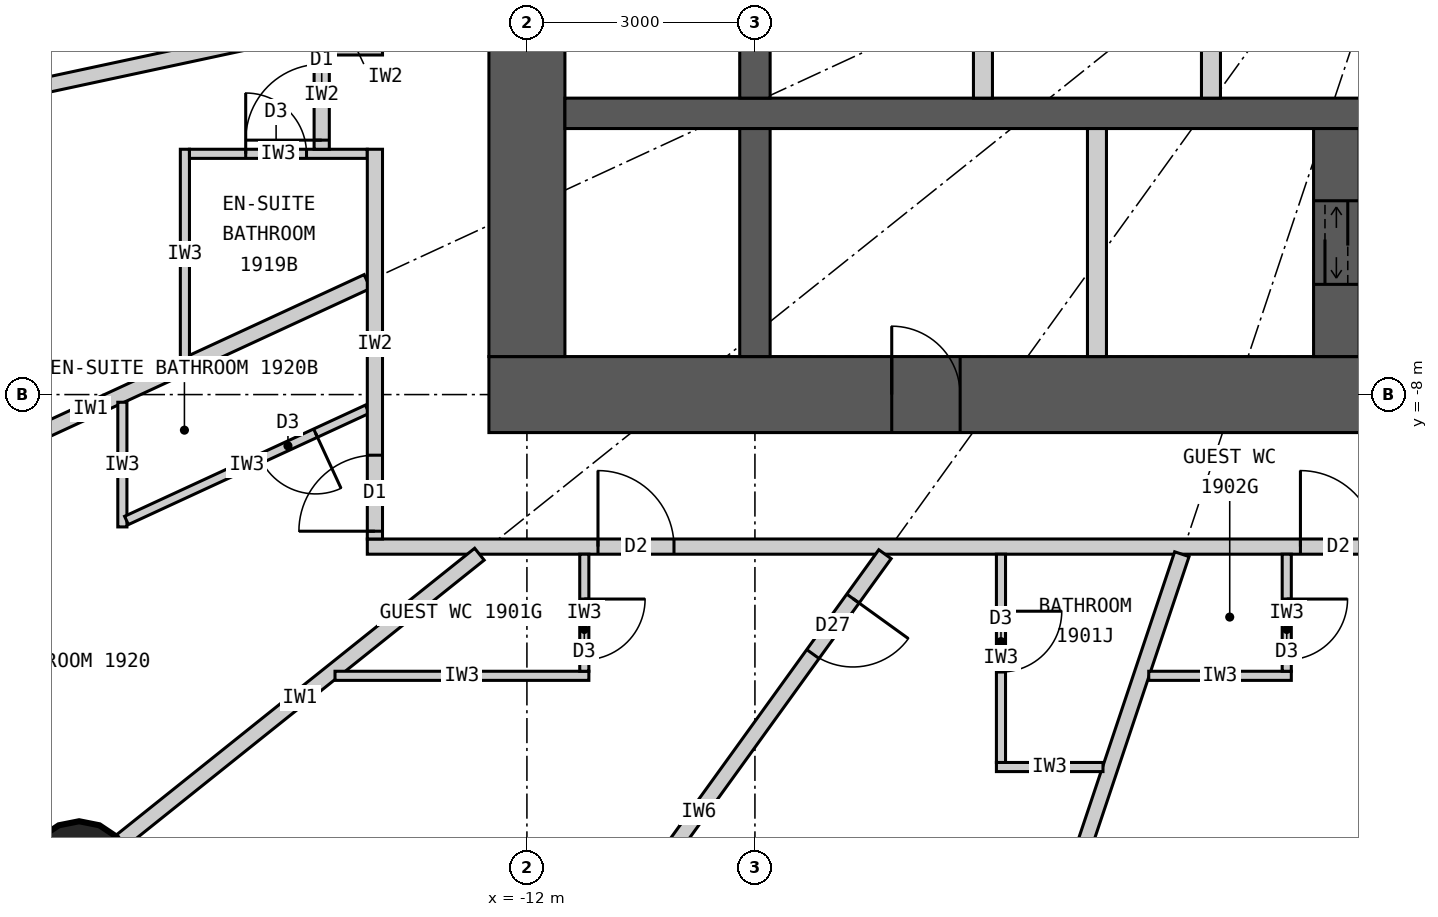
"""IFC4 building model, lengths in metres.
Left out: names, types, materials, properties, quantities, classifications, styles, units other than length and angle.
Written with IfcOpenShell. Run it as: python <this file> out.ifc"""

import sys

from ifc_helpers import new_model, si_unit, direction, frame, frame_2d, origin, origin_2d, place, context, subcontext, project, spatial, rectangle, circle, extrude, element, fill, save


model = new_model("IFC4")
c1 = context("Model", 3, precision=1e-05, world=origin(), true_north=direction((0.0, 1.0)))
c2 = subcontext(c1, "Body", "Model", "MODEL_VIEW")
j1 = project(units=[si_unit("LENGTHUNIT", "METRE"), si_unit("PLANEANGLEUNIT", "RADIAN")], contexts=[c1])
p1 = place(None, origin())
s1 = spatial("IfcSite", under=j1, at=p1, CompositionType="ELEMENT")
p2 = place(p1, origin())
s2 = spatial("IfcBuilding", under=s1, at=p2, CompositionType="ELEMENT")
p3 = place(p2, frame((0.0, 0.0, 77.1)))
s3 = spatial("IfcBuildingStorey", under=s2, at=p3, CompositionType="ELEMENT", Elevation=77.1)
p4 = place(p3, frame((-17.892, -14.313, 0.0), z_axis=(0.0, 0.0, 1.0), x_axis=(1.0, 0.0, 0.0)))
e1 = element("IfcColumn", 1, at=p4, inside=s3, PredefinedType="COLUMN", context=c2, shape_type="SweptSolid", body=[
    extrude(circle(Radius=0.7, at=origin_2d()), origin(), (0.0, 0.0, 1.0), 3.3),
])
p5 = place(p3, frame((12.5, -8.0, 0.0), z_axis=(0.0, 0.0, 1.0), x_axis=(-1.0, 0.0, 0.0)))
e2 = element("IfcWall", 2, at=p5, inside=s3, PredefinedType="SHEAR", context=c2, shape_type="SweptSolid", body=[
    extrude(rectangle(XDim=25.0, YDim=1.0, at=frame_2d((12.5, 0.0))), origin(), (0.0, 0.0, 1.0), 3.3),
])
p6 = place(p5, frame((11.2, 0.0, 0.0)))
e3 = element("IfcOpeningElement", 3, at=p6, cuts=e2, PredefinedType="OPENING", context=c2, shape_type="SweptSolid", body=[
    extrude(rectangle(XDim=1.2, YDim=2.2, at=frame_2d((0.6, 1.1))), frame((0.0, 0.51, 0.0), z_axis=(0.0, -1.0, 0.0), x_axis=(1.0, 0.0, 0.0)), (0.0, 0.0, 1.0), 1.02),
])
p7 = place(p5, frame((18.8, 0.0, 0.0)))
e4 = element("IfcOpeningElement", 4, at=p7, cuts=e2, PredefinedType="OPENING", context=c2, shape_type="SweptSolid", body=[
    extrude(rectangle(XDim=0.9, YDim=2.2, at=frame_2d((0.45, 1.1))), frame((0.0, 0.51, 0.0), z_axis=(0.0, -1.0, 0.0), x_axis=(1.0, 0.0, 0.0)), (0.0, 0.0, 1.0), 1.02),
])
p8 = place(p3, frame((-12.0, 7.5, 0.0), z_axis=(0.0, 0.0, 1.0), x_axis=(0.0, -1.0, 0.0)))
e5 = element("IfcWall", 5, at=p8, inside=s3, PredefinedType="SHEAR", context=c2, shape_type="SweptSolid", body=[
    extrude(rectangle(XDim=15.0, YDim=1.0, at=frame_2d((7.5, 0.0))), origin(), (0.0, 0.0, 1.0), 3.3),
])
p9 = place(p8, frame((6.6, 0.0, 0.0)))
e6 = element("IfcOpeningElement", 6, at=p9, cuts=e5, PredefinedType="OPENING", context=c2, shape_type="SweptSolid", body=[
    extrude(rectangle(XDim=1.8, YDim=2.2, at=frame_2d((0.9, 1.1))), frame((0.0, 0.51, 0.0), z_axis=(0.0, -1.0, 0.0), x_axis=(1.0, 0.0, 0.0)), (0.0, 0.0, 1.0), 1.02),
])
p10 = place(p3, frame((-11.5, -4.3, 0.0), z_axis=(0.0, 0.0, 1.0), x_axis=(1.0, 0.0, 0.0)))
e7 = element("IfcWall", 7, at=p10, inside=s3, PredefinedType="SHEAR", context=c2, shape_type="SweptSolid", body=[
    extrude(rectangle(XDim=23.0, YDim=0.4, at=frame_2d((11.5, 0.0))), origin(), (0.0, 0.0, 1.0), 3.3),
])
p11 = place(p3, frame((-9.0, -4.1, 0.0), z_axis=(0.0, 0.0, 1.0), x_axis=(0.0, 1.0, 0.0)))
e8 = element("IfcWall", 8, at=p11, inside=s3, PredefinedType="SHEAR", context=c2, shape_type="SweptSolid", body=[
    extrude(rectangle(XDim=2.35, YDim=0.4, at=frame_2d((1.175, 0.0))), origin(), (0.0, 0.0, 1.0), 3.3),
])
p12 = place(p3, frame((-9.0, -7.5, 0.0), z_axis=(0.0, 0.0, 1.0), x_axis=(0.0, 1.0, 0.0)))
e9 = element("IfcWall", 9, at=p12, inside=s3, PredefinedType="SHEAR", context=c2, shape_type="SweptSolid", body=[
    extrude(rectangle(XDim=3.0, YDim=0.4, at=frame_2d((1.5, 0.0))), origin(), (0.0, 0.0, 1.0), 3.3),
])
p13 = place(p3, frame((-1.35, -7.5, 0.0), z_axis=(0.0, 0.0, 1.0), x_axis=(0.0, 1.0, 0.0)))
e10 = element("IfcWall", 10, at=p13, inside=s3, PredefinedType="SHEAR", context=c2, shape_type="SweptSolid", body=[
    extrude(rectangle(XDim=3.0, YDim=0.6, at=frame_2d((1.5, 0.0))), origin(), (0.0, 0.0, 1.0), 3.3),
])
p14 = place(p13, frame((0.95, 0.0, 0.0)))
e11 = element("IfcOpeningElement", 11, at=p14, cuts=e10, PredefinedType="OPENING", context=c2, shape_type="SweptSolid", body=[
    extrude(rectangle(XDim=1.1, YDim=2.2, at=frame_2d((0.55, 1.1))), frame((0.0, 0.31, 0.0), z_axis=(0.0, -1.0, 0.0), x_axis=(1.0, 0.0, 0.0)), (0.0, 0.0, 1.0), 0.62),
])
p15 = place(p3, frame((-4.5, -7.5, 0.0), z_axis=(0.0, 0.0, 1.0), x_axis=(0.0, 1.0, 0.0)))
e12 = element("IfcWall", 12, at=p15, inside=s3, PredefinedType="PARTITIONING", context=c2, shape_type="SweptSolid", body=[
    extrude(rectangle(XDim=3.0, YDim=0.25, at=frame_2d((1.5, 0.0))), origin(), (0.0, 0.0, 1.0), 3.3),
])
for number, where, z_axis, x_axis in (
    (13, (-6.0, -4.1, 0.0), (0.0, 0.0, 1.0), (0.0, 1.0, 0.0)),
    (14, (-3.0, -4.1, 0.0), (0.0, 0.0, 1.0), (0.0, 1.0, 0.0)),
):
    element("IfcWall", number, at=place(p3, frame(where, z_axis=z_axis, x_axis=x_axis)), inside=s3, PredefinedType="PARTITIONING", context=c2, shape_type="SweptSolid", body=[
        extrude(rectangle(XDim=2.35, YDim=0.25, at=frame_2d((1.175, 0.0))), origin(), (0.0, 0.0, 1.0), 3.3),
    ])
p16 = place(p3, frame((14.1, -10.0, 0.0), z_axis=(0.0, 0.0, 1.0), x_axis=(-1.0, 0.0, 0.0)))
e15 = element("IfcWall", 15, at=p16, inside=s3, PredefinedType="PARTITIONING", context=c2, shape_type="SweptSolid", body=[
    extrude(rectangle(XDim=28.2, YDim=0.2, at=frame_2d((14.1, 0.0))), origin(), (0.0, 0.0, 1.0), 3.12),
])
p17 = place(p16, frame((24.165, 0.0, 0.0)))
e16 = element("IfcOpeningElement", 16, at=p17, cuts=e15, PredefinedType="OPENING", context=c2, shape_type="SweptSolid", body=[
    extrude(rectangle(XDim=1.0, YDim=2.2, at=frame_2d((0.5, 1.1))), frame((0.0, 0.11, 0.0), z_axis=(0.0, -1.0, 0.0), x_axis=(1.0, 0.0, 0.0)), (0.0, 0.0, 1.0), 0.22),
])
p18 = place(p16, frame((14.923, 0.0, 0.0)))
e17 = element("IfcOpeningElement", 17, at=p18, cuts=e15, PredefinedType="OPENING", context=c2, shape_type="SweptSolid", body=[
    extrude(rectangle(XDim=1.0, YDim=2.2, at=frame_2d((0.5, 1.1))), frame((0.0, 0.11, 0.0), z_axis=(0.0, -1.0, 0.0), x_axis=(1.0, 0.0, 0.0)), (0.0, 0.0, 1.0), 0.22),
])
p19 = place(p16, frame((3.035, 0.0, 0.0)))
e18 = element("IfcOpeningElement", 18, at=p19, cuts=e15, PredefinedType="OPENING", context=c2, shape_type="SweptSolid", body=[
    extrude(rectangle(XDim=1.0, YDim=2.2, at=frame_2d((0.5, 1.1))), frame((0.0, 0.11, 0.0), z_axis=(0.0, -1.0, 0.0), x_axis=(1.0, 0.0, 0.0)), (0.0, 0.0, 1.0), 0.22),
])
p20 = place(p3, frame((-14.1, -3.022, 0.0), z_axis=(0.0, 0.0, 1.0), x_axis=(-0.977790014929, -0.209586943072, 0.0)))
e19 = element("IfcWall", 19, at=p20, inside=s3, PredefinedType="PARTITIONING", context=c2, shape_type="SweptSolid", body=[
    extrude(rectangle(XDim=10.087, YDim=0.2, at=frame_2d((5.043, 0.0))), origin(), (0.0, 0.0, 1.0), 2.32),
])
p21 = place(p3, frame((-14.1, -6.512, 0.0), z_axis=(0.0, 0.0, 1.0), x_axis=(-0.907832871056, -0.419332181247, 0.0)))
e20 = element("IfcWall", 20, at=p21, inside=s3, PredefinedType="PARTITIONING", context=c2, shape_type="SweptSolid", body=[
    extrude(rectangle(XDim=8.023, YDim=0.2, at=frame_2d((4.011, 0.0))), origin(), (0.0, 0.0, 1.0), 2.32),
])
p22 = place(p3, frame((-12.625, -10.1, 0.0), z_axis=(0.0, 0.0, 1.0), x_axis=(-0.780892451574, -0.624665493744, 0.0)))
e21 = element("IfcWall", 21, at=p22, inside=s3, PredefinedType="PARTITIONING", context=c2, shape_type="SweptSolid", body=[
    extrude(rectangle(XDim=6.045, YDim=0.2, at=frame_2d((3.022, 0.0))), origin(), (0.0, 0.0, 1.0), 2.32),
])
p23 = place(p3, frame((-7.289, -10.1, 0.0), z_axis=(0.0, 0.0, 1.0), x_axis=(-0.585198353053, -0.810890182197, 0.0)))
e22 = element("IfcWall", 22, at=p23, inside=s3, PredefinedType="PARTITIONING", context=c2, shape_type="SweptSolid", body=[
    extrude(rectangle(XDim=8.36, YDim=0.2, at=frame_2d((4.18, 0.0))), origin(), (0.0, 0.0, 1.0), 2.32),
])
p24 = place(p23, frame((0.72, 0.0, 0.0)))
e23 = element("IfcOpeningElement", 23, at=p24, cuts=e22, PredefinedType="OPENING", context=c2, shape_type="SweptSolid", body=[
    extrude(rectangle(XDim=0.9, YDim=2.1, at=frame_2d((0.45, 1.05))), frame((0.0, 0.11, 0.0), z_axis=(0.0, -1.0, 0.0), x_axis=(1.0, 0.0, 0.0)), (0.0, 0.0, 1.0), 0.22),
])
p25 = place(p3, frame((-3.383, -10.1, 0.0), z_axis=(0.0, 0.0, 1.0), x_axis=(-0.31759592231, -0.948226149256, 0.0)))
e24 = element("IfcWall", 24, at=p25, inside=s3, PredefinedType="PARTITIONING", context=c2, shape_type="SweptSolid", body=[
    extrude(rectangle(XDim=9.098, YDim=0.2, at=frame_2d((4.549, 0.0))), origin(), (0.0, 0.0, 1.0), 2.32),
])
p26 = place(p3, frame((-14.525, -11.7, 0.0), z_axis=(0.0, 0.0, 1.0), x_axis=(1.0, 0.0, 0.0)))
e25 = element("IfcWall", 25, at=p26, inside=s3, PredefinedType="PARTITIONING", context=c2, shape_type="SweptSolid", body=[
    extrude(rectangle(XDim=3.34, YDim=0.12, at=frame_2d((1.67, 0.0))), origin(), (0.0, 0.0, 1.0), 3.12),
])
p27 = place(p3, frame((-11.245, -10.1, 0.0), z_axis=(0.0, 0.0, 1.0), x_axis=(0.0, -1.0, 0.0)))
e26 = element("IfcWall", 26, at=p27, inside=s3, PredefinedType="PARTITIONING", context=c2, shape_type="SweptSolid", body=[
    extrude(rectangle(XDim=1.54, YDim=0.12, at=frame_2d((0.77, 0.0))), origin(), (0.0, 0.0, 1.0), 3.12),
])
p28 = place(p27, frame((0.59, 0.0, 0.0)))
e27 = element("IfcOpeningElement", 27, at=p28, cuts=e26, PredefinedType="OPENING", context=c2, shape_type="SweptSolid", body=[
    extrude(rectangle(XDim=0.8, YDim=2.1, at=frame_2d((0.4, 1.05))), frame((0.0, 0.07, 0.0), z_axis=(0.0, -1.0, 0.0), x_axis=(1.0, 0.0, 0.0)), (0.0, 0.0, 1.0), 0.14),
])
p29 = place(p3, frame((-4.421, -12.9, 0.0), z_axis=(0.0, 0.0, 1.0), x_axis=(-1.0, 0.0, 0.0)))
e28 = element("IfcWall", 28, at=p29, inside=s3, PredefinedType="PARTITIONING", context=c2, shape_type="SweptSolid", body=[
    extrude(rectangle(XDim=1.402, YDim=0.12, at=frame_2d((0.701, 0.0))), origin(), (0.0, 0.0, 1.0), 3.12),
])
p30 = place(p3, frame((-5.763, -10.1, 0.0), z_axis=(0.0, 0.0, 1.0), x_axis=(0.0, -1.0, 0.0)))
e29 = element("IfcWall", 29, at=p30, inside=s3, PredefinedType="PARTITIONING", context=c2, shape_type="SweptSolid", body=[
    extrude(rectangle(XDim=2.74, YDim=0.12, at=frame_2d((1.37, 0.0))), origin(), (0.0, 0.0, 1.0), 3.12),
])
p31 = place(p30, frame((0.75, 0.0, 0.0)))
e30 = element("IfcOpeningElement", 30, at=p31, cuts=e29, PredefinedType="OPENING", context=c2, shape_type="SweptSolid", body=[
    extrude(rectangle(XDim=0.8, YDim=2.1, at=frame_2d((0.4, 1.05))), frame((0.0, 0.07, 0.0), z_axis=(0.0, -1.0, 0.0), x_axis=(1.0, 0.0, 0.0)), (0.0, 0.0, 1.0), 0.14),
])
p32 = place(p3, frame((-3.819, -11.7, 0.0), z_axis=(0.0, 0.0, 1.0), x_axis=(1.0, 0.0, 0.0)))
e31 = element("IfcWall", 31, at=p32, inside=s3, PredefinedType="PARTITIONING", context=c2, shape_type="SweptSolid", body=[
    extrude(rectangle(XDim=1.876, YDim=0.12, at=frame_2d((0.938, 0.0))), origin(), (0.0, 0.0, 1.0), 3.12),
])
p33 = place(p3, frame((-2.003, -10.1, 0.0), z_axis=(0.0, 0.0, 1.0), x_axis=(0.0, -1.0, 0.0)))
e32 = element("IfcWall", 32, at=p33, inside=s3, PredefinedType="PARTITIONING", context=c2, shape_type="SweptSolid", body=[
    extrude(rectangle(XDim=1.54, YDim=0.12, at=frame_2d((0.77, 0.0))), origin(), (0.0, 0.0, 1.0), 3.12),
])
p34 = place(p33, frame((0.59, 0.0, 0.0)))
e33 = element("IfcOpeningElement", 33, at=p34, cuts=e32, PredefinedType="OPENING", context=c2, shape_type="SweptSolid", body=[
    extrude(rectangle(XDim=0.8, YDim=2.1, at=frame_2d((0.4, 1.05))), frame((0.0, 0.07, 0.0), z_axis=(0.0, -1.0, 0.0), x_axis=(1.0, 0.0, 0.0)), (0.0, 0.0, 1.0), 0.14),
])
p35 = place(p3, frame((-16.5, -7.521, 0.0), z_axis=(0.0, 0.0, 1.0), x_axis=(0.0, 1.0, 0.0)))
e34 = element("IfcWall", 34, at=p35, inside=s3, PredefinedType="PARTITIONING", context=c2, shape_type="SweptSolid", body=[
    extrude(rectangle(XDim=2.749, YDim=0.12, at=frame_2d((1.374, 0.0))), origin(), (0.0, 0.0, 1.0), 3.12),
])
p36 = place(p3, frame((-14.1, -4.833, 0.0), z_axis=(0.0, 0.0, 1.0), x_axis=(-1.0, 0.0, 0.0)))
e35 = element("IfcWall", 35, at=p36, inside=s3, PredefinedType="PARTITIONING", context=c2, shape_type="SweptSolid", body=[
    extrude(rectangle(XDim=2.34, YDim=0.12, at=frame_2d((1.17, 0.0))), origin(), (0.0, 0.0, 1.0), 3.12),
])
p37 = place(p36, frame((0.8, 0.0, 0.0)))
e36 = element("IfcOpeningElement", 36, at=p37, cuts=e35, PredefinedType="OPENING", context=c2, shape_type="SweptSolid", body=[
    extrude(rectangle(XDim=0.8, YDim=2.1, at=frame_2d((0.4, 1.05))), frame((0.0, 0.07, 0.0), z_axis=(0.0, -1.0, 0.0), x_axis=(1.0, 0.0, 0.0)), (0.0, 0.0, 1.0), 0.14),
])
p38 = place(p3, frame((-17.323, -8.101, 0.0), z_axis=(0.0, 0.0, 1.0), x_axis=(0.0, -1.0, 0.0)))
e37 = element("IfcWall", 37, at=p38, inside=s3, PredefinedType="PARTITIONING", context=c2, shape_type="SweptSolid", body=[
    extrude(rectangle(XDim=1.64, YDim=0.12, at=frame_2d((0.82, 0.0))), origin(), (0.0, 0.0, 1.0), 3.12),
])
p39 = place(p3, frame((-14.1, -8.193, 0.0), z_axis=(0.0, 0.0, 1.0), x_axis=(-0.907836493557, -0.419324338628, 0.0)))
e38 = element("IfcWall", 38, at=p39, inside=s3, PredefinedType="PARTITIONING", context=c2, shape_type="SweptSolid", body=[
    extrude(rectangle(XDim=3.49, YDim=0.12, at=frame_2d((1.745, 0.0))), origin(), (0.0, 0.0, 1.0), 3.12),
])
p40 = place(p39, frame((0.75, 0.0, 0.0)))
e39 = element("IfcOpeningElement", 39, at=p40, cuts=e38, PredefinedType="OPENING", context=c2, shape_type="SweptSolid", body=[
    extrude(rectangle(XDim=0.8, YDim=2.1, at=frame_2d((0.4, 1.05))), frame((0.0, 0.07, 0.0), z_axis=(0.0, -1.0, 0.0), x_axis=(1.0, 0.0, 0.0)), (0.0, 0.0, 1.0), 0.14),
])
p41 = place(p3, frame((-14.7, -3.333, 0.0), z_axis=(0.0, 0.0, 1.0), x_axis=(0.0, -1.0, 0.0)))
e40 = element("IfcWall", 40, at=p41, inside=s3, PredefinedType="PARTITIONING", context=c2, shape_type="SweptSolid", body=[
    extrude(rectangle(XDim=1.44, YDim=0.2, at=frame_2d((0.72, 0.0))), origin(), (0.0, 0.0, 1.0), 3.12),
])
p42 = place(p41, frame((0.32, 0.0, 0.0)))
e41 = element("IfcOpeningElement", 41, at=p42, cuts=e40, PredefinedType="OPENING", context=c2, shape_type="SweptSolid", body=[
    extrude(rectangle(XDim=1.0, YDim=2.2, at=frame_2d((0.5, 1.1))), frame((0.0, 0.11, 0.0), z_axis=(0.0, -1.0, 0.0), x_axis=(1.0, 0.0, 0.0)), (0.0, 0.0, 1.0), 0.22),
])
p43 = place(p3, frame((-13.9, -3.433, 0.0), z_axis=(0.0, 0.0, 1.0), x_axis=(-1.0, 0.0, 0.0)))
e42 = element("IfcWall", 42, at=p43, inside=s3, PredefinedType="PARTITIONING", context=c2, shape_type="SweptSolid", body=[
    extrude(rectangle(XDim=0.7, YDim=0.2, at=frame_2d((0.35, 0.0))), origin(), (0.0, 0.0, 1.0), 2.32),
])
p44 = place(p3, frame((-14.0, -4.772, 0.0), z_axis=(0.0, 0.0, 1.0), x_axis=(0.0, -1.0, 0.0)))
e43 = element("IfcWall", 43, at=p44, inside=s3, PredefinedType="PARTITIONING", context=c2, shape_type="SweptSolid", body=[
    extrude(rectangle(XDim=5.127, YDim=0.2, at=frame_2d((2.564, 0.0))), origin(), (0.0, 0.0, 1.0), 3.12),
])
p45 = place(p44, frame((4.025, 0.0, 0.0)))
e44 = element("IfcOpeningElement", 44, at=p45, cuts=e43, PredefinedType="OPENING", context=c2, shape_type="SweptSolid", body=[
    extrude(rectangle(XDim=1.0, YDim=2.2, at=frame_2d((0.5, 1.1))), frame((0.0, 0.11, 0.0), z_axis=(0.0, -1.0, 0.0), x_axis=(1.0, 0.0, 0.0)), (0.0, 0.0, 1.0), 0.22),
])
p46 = place(p28, origin())
e45 = element("IfcDoor", 45, at=p46, inside=s3, OperationType="SINGLE_SWING_LEFT", PredefinedType="DOOR", context=c2, shape_type="SweptSolid", body=[
    extrude(rectangle(XDim=0.8, YDim=2.1, at=frame_2d((0.4, 1.05))), frame((0.0, 0.025, 0.0), z_axis=(0.0, -1.0, 0.0), x_axis=(1.0, 0.0, 0.0)), (0.0, 0.0, 1.0), 0.05),
])
fill(e27, e45)
p47 = place(p17, origin())
e46 = element("IfcDoor", 46, at=p47, inside=s3, OperationType="SINGLE_SWING_RIGHT", PredefinedType="DOOR", context=c2, shape_type="SweptSolid", body=[
    extrude(rectangle(XDim=1.0, YDim=2.2, at=frame_2d((0.5, 1.1))), frame((0.0, 0.025, 0.0), z_axis=(0.0, -1.0, 0.0), x_axis=(1.0, 0.0, 0.0)), (0.0, 0.0, 1.0), 0.05),
])
fill(e16, e46)
p48 = place(p31, origin())
e47 = element("IfcDoor", 47, at=p48, inside=s3, OperationType="SINGLE_SWING_LEFT", PredefinedType="DOOR", context=c2, shape_type="SweptSolid", body=[
    extrude(rectangle(XDim=0.8, YDim=2.1, at=frame_2d((0.4, 1.05))), frame((0.0, 0.025, 0.0), z_axis=(0.0, -1.0, 0.0), x_axis=(1.0, 0.0, 0.0)), (0.0, 0.0, 1.0), 0.05),
])
fill(e30, e47)
p49 = place(p24, origin())
e48 = element("IfcDoor", 48, at=p49, inside=s3, OperationType="SINGLE_SWING_LEFT", PredefinedType="DOOR", context=c2, shape_type="SweptSolid", body=[
    extrude(rectangle(XDim=0.9, YDim=2.1, at=frame_2d((0.45, 1.05))), frame((0.0, 0.025, 0.0), z_axis=(0.0, -1.0, 0.0), x_axis=(1.0, 0.0, 0.0)), (0.0, 0.0, 1.0), 0.05),
])
fill(e23, e48)
p50 = place(p34, origin())
e49 = element("IfcDoor", 49, at=p50, inside=s3, OperationType="SINGLE_SWING_LEFT", PredefinedType="DOOR", context=c2, shape_type="SweptSolid", body=[
    extrude(rectangle(XDim=0.8, YDim=2.1, at=frame_2d((0.4, 1.05))), frame((0.0, 0.025, 0.0), z_axis=(0.0, -1.0, 0.0), x_axis=(1.0, 0.0, 0.0)), (0.0, 0.0, 1.0), 0.05),
])
fill(e33, e49)
p51 = place(p18, origin())
e50 = element("IfcDoor", 50, at=p51, inside=s3, OperationType="SINGLE_SWING_RIGHT", PredefinedType="DOOR", context=c2, shape_type="SweptSolid", body=[
    extrude(rectangle(XDim=1.0, YDim=2.2, at=frame_2d((0.5, 1.1))), frame((0.0, 0.025, 0.0), z_axis=(0.0, -1.0, 0.0), x_axis=(1.0, 0.0, 0.0)), (0.0, 0.0, 1.0), 0.05),
])
fill(e17, e50)
p52 = place(p37, origin())
e51 = element("IfcDoor", 51, at=p52, inside=s3, OperationType="SINGLE_SWING_RIGHT", PredefinedType="DOOR", context=c2, shape_type="SweptSolid", body=[
    extrude(rectangle(XDim=0.8, YDim=2.1, at=frame_2d((0.4, 1.05))), frame((0.0, 0.025, 0.0), z_axis=(0.0, -1.0, 0.0), x_axis=(1.0, 0.0, 0.0)), (0.0, 0.0, 1.0), 0.05),
])
fill(e36, e51)
p53 = place(p42, origin())
e52 = element("IfcDoor", 52, at=p53, inside=s3, OperationType="SINGLE_SWING_RIGHT", PredefinedType="DOOR", context=c2, shape_type="SweptSolid", body=[
    extrude(rectangle(XDim=1.0, YDim=2.2, at=frame_2d((0.5, 1.1))), frame((0.0, 0.025, 0.0), z_axis=(0.0, -1.0, 0.0), x_axis=(1.0, 0.0, 0.0)), (0.0, 0.0, 1.0), 0.05),
])
fill(e41, e52)
p54 = place(p40, origin())
e53 = element("IfcDoor", 53, at=p54, inside=s3, OperationType="SINGLE_SWING_LEFT", PredefinedType="DOOR", context=c2, shape_type="SweptSolid", body=[
    extrude(rectangle(XDim=0.8, YDim=2.1, at=frame_2d((0.4, 1.05))), frame((0.0, 0.025, 0.0), z_axis=(0.0, -1.0, 0.0), x_axis=(1.0, 0.0, 0.0)), (0.0, 0.0, 1.0), 0.05),
])
fill(e39, e53)
p55 = place(p45, origin())
e54 = element("IfcDoor", 54, at=p55, inside=s3, OperationType="SINGLE_SWING_RIGHT", PredefinedType="DOOR", context=c2, shape_type="SweptSolid", body=[
    extrude(rectangle(XDim=1.0, YDim=2.2, at=frame_2d((0.5, 1.1))), frame((0.0, 0.025, 0.0), z_axis=(0.0, -1.0, 0.0), x_axis=(1.0, 0.0, 0.0)), (0.0, 0.0, 1.0), 0.05),
])
fill(e44, e54)
p56 = place(p14, origin())
e55 = element("IfcDoor", 55, at=p56, inside=s3, OperationType="DOUBLE_DOOR_SLIDING", PredefinedType="DOOR", context=c2, shape_type="SweptSolid", body=[
    extrude(rectangle(XDim=1.1, YDim=2.2, at=frame_2d((0.55, 1.1))), frame((0.0, 0.025, 0.0), z_axis=(0.0, -1.0, 0.0), x_axis=(1.0, 0.0, 0.0)), (0.0, 0.0, 1.0), 0.05),
])
fill(e11, e55)
p57 = place(p7, origin())
e56 = element("IfcDoor", 56, at=p57, inside=s3, OperationType="SINGLE_SWING_RIGHT", PredefinedType="DOOR", context=c2, shape_type="SweptSolid", body=[
    extrude(rectangle(XDim=0.9, YDim=2.2, at=frame_2d((0.45, 1.1))), frame((0.0, 0.025, 0.0), z_axis=(0.0, -1.0, 0.0), x_axis=(1.0, 0.0, 0.0)), (0.0, 0.0, 1.0), 0.05),
])
fill(e4, e56)
save(model, sys.argv[1])
